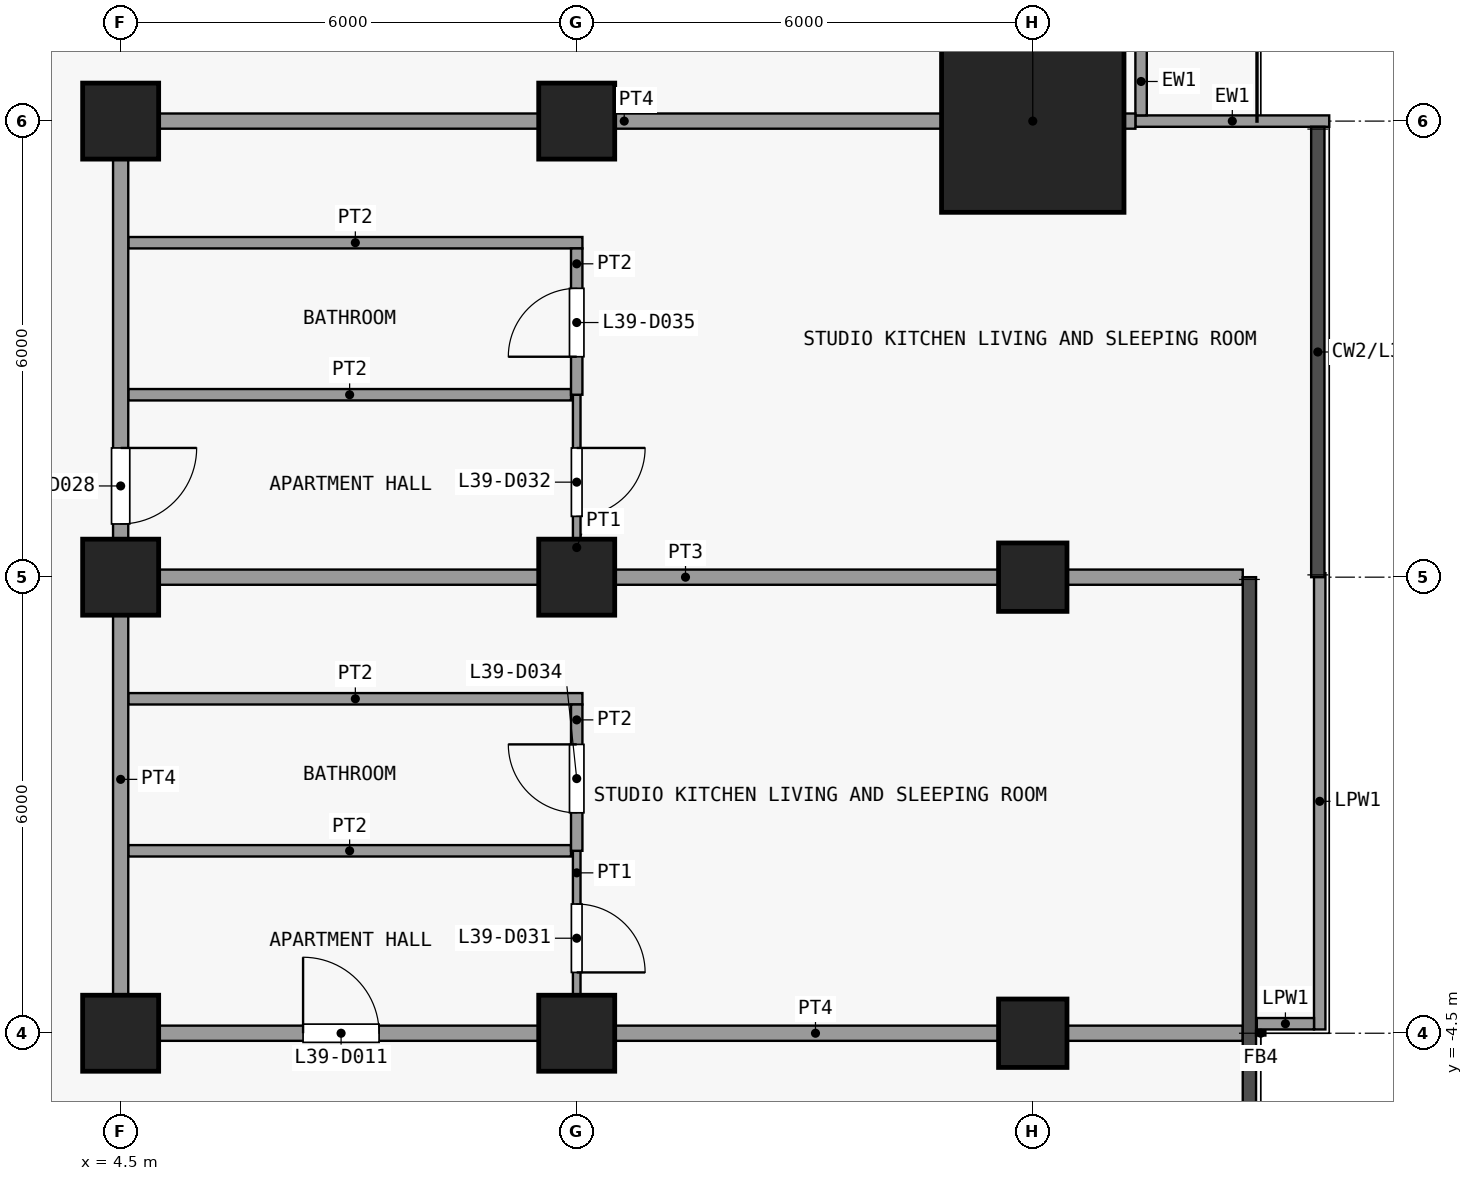
"""IFC4 building model, lengths in metres.
Left out: names, types, materials, properties, quantities, classifications, styles, units other than length and angle.
Written with IfcOpenShell. Run it as: python <this file> out.ifc"""

import sys

from ifc_helpers import new_model, si_unit, direction, frame, frame_2d, origin, origin_2d, place, context, subcontext, project, spatial, rectangle, extrude, element, fill, save


model = new_model("IFC4")
c1 = context("Model", 3, precision=1e-05, world=origin(), true_north=direction((0.0, 1.0)))
c2 = subcontext(c1, "Body", "Model", "MODEL_VIEW")
j1 = project(units=[si_unit("LENGTHUNIT", "METRE"), si_unit("PLANEANGLEUNIT", "RADIAN")], contexts=[c1])
p1 = place(None, origin())
s1 = spatial("IfcSite", under=j1, at=p1, CompositionType="ELEMENT")
p2 = place(p1, origin())
s2 = spatial("IfcBuilding", under=s1, at=p2, CompositionType="ELEMENT")
p3 = place(p2, frame((0.0, 0.0, 160.1)))
s3 = spatial("IfcBuildingStorey", under=s2, at=p3, CompositionType="ELEMENT", Elevation=160.1)
for number, where, z_axis, x_axis in (
    (1, (4.5, -4.5, 0.0), (0.0, 0.0, 1.0), (1.0, 0.0, 0.0)),
    (2, (4.5, 1.5, 0.0), (0.0, 0.0, 1.0), (1.0, 0.0, 0.0)),
    (3, (4.5, 7.5, 0.0), (0.0, 0.0, 1.0), (1.0, 0.0, 0.0)),
    (4, (10.5, -4.5, 0.0), (0.0, 0.0, 1.0), (1.0, 0.0, 0.0)),
    (5, (10.5, 1.5, 0.0), (0.0, 0.0, 1.0), (1.0, 0.0, 0.0)),
    (6, (10.5, 7.5, 0.0), (0.0, 0.0, 1.0), (1.0, 0.0, 0.0)),
):
    element("IfcColumn", number, at=place(p3, frame(where, z_axis=z_axis, x_axis=x_axis)), inside=s3, PredefinedType="COLUMN", context=c2, shape_type="SweptSolid", body=[
        extrude(rectangle(XDim=1.0, YDim=1.0, at=origin_2d()), origin(), (0.0, 0.0, 1.0), 3.6),
    ])
for number, where, z_axis, x_axis in (
    (7, (16.5, -4.5, 0.0), (0.0, 0.0, 1.0), (1.0, 0.0, 0.0)),
    (8, (16.5, 1.5, 0.0), (0.0, 0.0, 1.0), (1.0, 0.0, 0.0)),
):
    element("IfcColumn", number, at=place(p3, frame(where, z_axis=z_axis, x_axis=x_axis)), inside=s3, PredefinedType="COLUMN", context=c2, shape_type="SweptSolid", body=[
        extrude(rectangle(XDim=0.9, YDim=0.9, at=origin_2d()), origin(), (0.0, 0.0, 1.0), 3.6),
    ])
p4 = place(p3, frame((16.5, 7.5, 0.0), z_axis=(0.0, 0.0, 1.0), x_axis=(1.0, 0.0, 0.0)))
e9 = element("IfcColumn", 9, at=p4, inside=s3, PredefinedType="COLUMN", context=c2, shape_type="SweptSolid", body=[
    extrude(rectangle(XDim=2.4, YDim=2.4, at=origin_2d()), origin(), (0.0, 0.0, 1.0), 3.6),
])
p5 = place(p3, frame((17.85, 7.5, 0.0), z_axis=(0.0, 0.0, 1.0), x_axis=(1.0, 0.0, 0.0)))
e10 = element("IfcWall", 10, at=p5, inside=s3, PredefinedType="SOLIDWALL", context=c2, shape_type="SweptSolid", body=[
    extrude(rectangle(XDim=2.55, YDim=0.15, at=frame_2d((1.275, 0.0))), origin(), (0.0, 0.0, 1.0), 3.3),
])
p6 = place(p3, frame((17.925, 13.425, 0.0), z_axis=(0.0, 0.0, 1.0), x_axis=(0.0, -1.0, 0.0)))
e11 = element("IfcWall", 11, at=p6, inside=s3, PredefinedType="SOLIDWALL", context=c2, shape_type="SweptSolid", body=[
    extrude(rectangle(XDim=5.85, YDim=0.15, at=frame_2d((2.925, 0.0))), origin(), (0.0, 0.0, 1.0), 3.3),
])
p7 = place(p6, frame((0.825, 0.0, 0.0)))
e12 = element("IfcOpeningElement", 12, at=p7, cuts=e11, PredefinedType="OPENING", context=c2, shape_type="SweptSolid", body=[
    extrude(rectangle(XDim=1.2, YDim=2.4, at=frame_2d((0.6, 1.2))), frame((0.0, 0.085, 0.0), z_axis=(0.0, -1.0, 0.0), x_axis=(1.0, 0.0, 0.0)), (0.0, 0.0, 1.0), 0.17),
])
p8 = place(p6, frame((3.038, 0.0, 0.9)))
e13 = element("IfcOpeningElement", 13, at=p8, cuts=e11, PredefinedType="OPENING", context=c2, shape_type="SweptSolid", body=[
    extrude(rectangle(XDim=1.8, YDim=2.1, at=frame_2d((0.9, 1.05))), frame((0.0, 0.085, 0.0), z_axis=(0.0, -1.0, 0.0), x_axis=(1.0, 0.0, 0.0)), (0.0, 0.0, 1.0), 0.17),
])
p9 = place(p3, frame((20.275, 1.552, 0.0), z_axis=(0.0, 0.0, 1.0), x_axis=(0.0, -1.0, 0.0)))
e14 = element("IfcWall", 14, at=p9, inside=s3, PredefinedType="PARAPET", context=c2, shape_type="SweptSolid", body=[
    extrude(rectangle(XDim=6.002, YDim=0.15, at=frame_2d((3.001, 0.0))), origin(), (0.0, 0.0, 1.0), 1.15),
])
p10 = place(p3, frame((20.2, -4.375, 0.0), z_axis=(0.0, 0.0, 1.0), x_axis=(-1.0, 0.0, 0.0)))
e15 = element("IfcWall", 15, at=p10, inside=s3, PredefinedType="PARAPET", context=c2, shape_type="SweptSolid", body=[
    extrude(rectangle(XDim=0.752, YDim=0.15, at=frame_2d((0.376, 0.0))), origin(), (0.0, 0.0, 1.0), 1.15),
])
p11 = place(p3, frame((4.4, -4.5, 0.0), z_axis=(0.0, 0.0, 1.0), x_axis=(1.0, 0.0, 0.0)))
e16 = element("IfcWall", 16, at=p11, inside=s3, PredefinedType="PARTITIONING", context=c2, shape_type="SweptSolid", body=[
    extrude(rectangle(XDim=14.863, YDim=0.2, at=frame_2d((7.431, 0.0))), origin(), (0.0, 0.0, 1.0), 3.3),
])
p12 = place(p11, frame((2.5, 0.0, 0.0)))
e17 = element("IfcOpeningElement", 17, at=p12, cuts=e16, PredefinedType="OPENING", context=c2, shape_type="SweptSolid", body=[
    extrude(rectangle(XDim=1.0, YDim=2.1, at=frame_2d((0.5, 1.05))), frame((0.0, 0.11, 0.0), z_axis=(0.0, -1.0, 0.0), x_axis=(1.0, 0.0, 0.0)), (0.0, 0.0, 1.0), 0.22),
])
p13 = place(p3, frame((4.6, -2.1, 0.0), z_axis=(0.0, 0.0, 1.0), x_axis=(1.0, 0.0, 0.0)))
e18 = element("IfcWall", 18, at=p13, inside=s3, PredefinedType="PARTITIONING", context=c2, shape_type="SweptSolid", body=[
    extrude(rectangle(XDim=5.825, YDim=0.15, at=frame_2d((2.913, 0.0))), origin(), (0.0, 0.0, 1.0), 3.3),
])
p14 = place(p3, frame((4.6, -0.1, 0.0), z_axis=(0.0, 0.0, 1.0), x_axis=(1.0, 0.0, 0.0)))
e19 = element("IfcWall", 19, at=p14, inside=s3, PredefinedType="PARTITIONING", context=c2, shape_type="SweptSolid", body=[
    extrude(rectangle(XDim=5.975, YDim=0.15, at=frame_2d((2.987, 0.0))), origin(), (0.0, 0.0, 1.0), 3.3),
])
p15 = place(p3, frame((4.6, 1.5, 0.0), z_axis=(0.0, 0.0, 1.0), x_axis=(1.0, 0.0, 0.0)))
e20 = element("IfcWall", 20, at=p15, inside=s3, PredefinedType="PARTITIONING", context=c2, shape_type="SweptSolid", body=[
    extrude(rectangle(XDim=14.662, YDim=0.2, at=frame_2d((7.331, 0.0))), origin(), (0.0, 0.0, 1.0), 3.3),
])
p16 = place(p3, frame((4.6, 3.9, 0.0), z_axis=(0.0, 0.0, 1.0), x_axis=(1.0, 0.0, 0.0)))
e21 = element("IfcWall", 21, at=p16, inside=s3, PredefinedType="PARTITIONING", context=c2, shape_type="SweptSolid", body=[
    extrude(rectangle(XDim=5.825, YDim=0.15, at=frame_2d((2.913, 0.0))), origin(), (0.0, 0.0, 1.0), 3.3),
])
p17 = place(p3, frame((4.6, 5.9, 0.0), z_axis=(0.0, 0.0, 1.0), x_axis=(1.0, 0.0, 0.0)))
e22 = element("IfcWall", 22, at=p17, inside=s3, PredefinedType="PARTITIONING", context=c2, shape_type="SweptSolid", body=[
    extrude(rectangle(XDim=5.975, YDim=0.15, at=frame_2d((2.987, 0.0))), origin(), (0.0, 0.0, 1.0), 3.3),
])
p18 = place(p3, frame((4.4, 7.5, 0.0), z_axis=(0.0, 0.0, 1.0), x_axis=(1.0, 0.0, 0.0)))
e23 = element("IfcWall", 23, at=p18, inside=s3, PredefinedType="PARTITIONING", context=c2, shape_type="SweptSolid", body=[
    extrude(rectangle(XDim=13.45, YDim=0.2, at=frame_2d((6.725, 0.0))), origin(), (0.0, 0.0, 1.0), 3.3),
])
p19 = place(p3, frame((4.5, -4.4, 0.0), z_axis=(0.0, 0.0, 1.0), x_axis=(0.0, 1.0, 0.0)))
e24 = element("IfcWall", 24, at=p19, inside=s3, PredefinedType="PARTITIONING", context=c2, shape_type="SweptSolid", body=[
    extrude(rectangle(XDim=11.8, YDim=0.2, at=frame_2d((5.9, 0.0))), origin(), (0.0, 0.0, 1.0), 3.3),
])
p20 = place(p19, frame((6.6, 0.0, 0.0)))
e25 = element("IfcOpeningElement", 25, at=p20, cuts=e24, PredefinedType="OPENING", context=c2, shape_type="SweptSolid", body=[
    extrude(rectangle(XDim=1.0, YDim=2.1, at=frame_2d((0.5, 1.05))), frame((0.0, 0.11, 0.0), z_axis=(0.0, -1.0, 0.0), x_axis=(1.0, 0.0, 0.0)), (0.0, 0.0, 1.0), 0.22),
])
p21 = place(p3, frame((10.5, -4.4, 0.0), z_axis=(0.0, 0.0, 1.0), x_axis=(0.0, 1.0, 0.0)))
e26 = element("IfcWall", 26, at=p21, inside=s3, PredefinedType="PARTITIONING", context=c2, shape_type="SweptSolid", body=[
    extrude(rectangle(XDim=2.3, YDim=0.1, at=frame_2d((1.15, 0.0))), origin(), (0.0, 0.0, 1.0), 3.3),
])
p22 = place(p21, frame((0.7, 0.0, 0.0)))
e27 = element("IfcOpeningElement", 27, at=p22, cuts=e26, PredefinedType="OPENING", context=c2, shape_type="SweptSolid", body=[
    extrude(rectangle(XDim=0.9, YDim=2.1, at=frame_2d((0.45, 1.05))), frame((0.0, 0.06, 0.0), z_axis=(0.0, -1.0, 0.0), x_axis=(1.0, 0.0, 0.0)), (0.0, 0.0, 1.0), 0.12),
])
p23 = place(p3, frame((10.5, 1.6, 0.0), z_axis=(0.0, 0.0, 1.0), x_axis=(0.0, 1.0, 0.0)))
e28 = element("IfcWall", 28, at=p23, inside=s3, PredefinedType="PARTITIONING", context=c2, shape_type="SweptSolid", body=[
    extrude(rectangle(XDim=2.3, YDim=0.1, at=frame_2d((1.15, 0.0))), origin(), (0.0, 0.0, 1.0), 3.3),
])
p24 = place(p23, frame((0.7, 0.0, 0.0)))
e29 = element("IfcOpeningElement", 29, at=p24, cuts=e28, PredefinedType="OPENING", context=c2, shape_type="SweptSolid", body=[
    extrude(rectangle(XDim=0.9, YDim=2.1, at=frame_2d((0.45, 1.05))), frame((0.0, 0.06, 0.0), z_axis=(0.0, -1.0, 0.0), x_axis=(1.0, 0.0, 0.0)), (0.0, 0.0, 1.0), 0.12),
])
p25 = place(p3, frame((10.5, -2.1, 0.0), z_axis=(0.0, 0.0, 1.0), x_axis=(0.0, 1.0, 0.0)))
e30 = element("IfcWall", 30, at=p25, inside=s3, PredefinedType="PARTITIONING", context=c2, shape_type="SweptSolid", body=[
    extrude(rectangle(XDim=1.925, YDim=0.15, at=frame_2d((0.962, 0.0))), origin(), (0.0, 0.0, 1.0), 3.3),
])
p26 = place(p25, frame((0.5, 0.0, 0.0)))
e31 = element("IfcOpeningElement", 31, at=p26, cuts=e30, PredefinedType="OPENING", context=c2, shape_type="SweptSolid", body=[
    extrude(rectangle(XDim=0.9, YDim=2.1, at=frame_2d((0.45, 1.05))), frame((0.0, 0.085, 0.0), z_axis=(0.0, -1.0, 0.0), x_axis=(1.0, 0.0, 0.0)), (0.0, 0.0, 1.0), 0.17),
])
p27 = place(p3, frame((10.5, 3.9, 0.0), z_axis=(0.0, 0.0, 1.0), x_axis=(0.0, 1.0, 0.0)))
e32 = element("IfcWall", 32, at=p27, inside=s3, PredefinedType="PARTITIONING", context=c2, shape_type="SweptSolid", body=[
    extrude(rectangle(XDim=1.925, YDim=0.15, at=frame_2d((0.962, 0.0))), origin(), (0.0, 0.0, 1.0), 3.3),
])
p28 = place(p27, frame((0.5, 0.0, 0.0)))
e33 = element("IfcOpeningElement", 33, at=p28, cuts=e32, PredefinedType="OPENING", context=c2, shape_type="SweptSolid", body=[
    extrude(rectangle(XDim=0.9, YDim=2.1, at=frame_2d((0.45, 1.05))), frame((0.0, 0.085, 0.0), z_axis=(0.0, -1.0, 0.0), x_axis=(1.0, 0.0, 0.0)), (0.0, 0.0, 1.0), 0.17),
])
p29 = place(p12, origin())
e34 = element("IfcDoor", 34, at=p29, inside=s3, OperationType="SINGLE_SWING_RIGHT", PredefinedType="DOOR", context=c2, shape_type="SweptSolid", body=[
    extrude(rectangle(XDim=1.0, YDim=2.1, at=frame_2d((0.5, 1.05))), frame((0.0, 0.025, 0.0), z_axis=(0.0, -1.0, 0.0), x_axis=(1.0, 0.0, 0.0)), (0.0, 0.0, 1.0), 0.05),
])
fill(e17, e34)
p30 = place(p20, origin())
e35 = element("IfcDoor", 35, at=p30, inside=s3, OperationType="SINGLE_SWING_RIGHT", PredefinedType="DOOR", context=c2, shape_type="SweptSolid", body=[
    extrude(rectangle(XDim=1.0, YDim=2.1, at=frame_2d((0.5, 1.05))), frame((0.0, 0.025, 0.0), z_axis=(0.0, -1.0, 0.0), x_axis=(1.0, 0.0, 0.0)), (0.0, 0.0, 1.0), 0.05),
])
fill(e25, e35)
p31 = place(p22, origin())
e36 = element("IfcDoor", 36, at=p31, inside=s3, OperationType="SINGLE_SWING_LEFT", PredefinedType="DOOR", context=c2, shape_type="SweptSolid", body=[
    extrude(rectangle(XDim=0.9, YDim=2.1, at=frame_2d((0.45, 1.05))), frame((0.0, 0.025, 0.0), z_axis=(0.0, -1.0, 0.0), x_axis=(1.0, 0.0, 0.0)), (0.0, 0.0, 1.0), 0.05),
])
fill(e27, e36)
p32 = place(p24, origin())
e37 = element("IfcDoor", 37, at=p32, inside=s3, OperationType="SINGLE_SWING_RIGHT", PredefinedType="DOOR", context=c2, shape_type="SweptSolid", body=[
    extrude(rectangle(XDim=0.9, YDim=2.1, at=frame_2d((0.45, 1.05))), frame((0.0, 0.025, 0.0), z_axis=(0.0, -1.0, 0.0), x_axis=(1.0, 0.0, 0.0)), (0.0, 0.0, 1.0), 0.05),
])
fill(e29, e37)
p33 = place(p26, origin())
e38 = element("IfcDoor", 38, at=p33, inside=s3, OperationType="SINGLE_SWING_LEFT", PredefinedType="DOOR", context=c2, shape_type="SweptSolid", body=[
    extrude(rectangle(XDim=0.9, YDim=2.1, at=frame_2d((0.45, 1.05))), frame((0.0, 0.025, 0.0), z_axis=(0.0, -1.0, 0.0), x_axis=(1.0, 0.0, 0.0)), (0.0, 0.0, 1.0), 0.05),
])
fill(e31, e38)
p34 = place(p28, origin())
e39 = element("IfcDoor", 39, at=p34, inside=s3, OperationType="SINGLE_SWING_RIGHT", PredefinedType="DOOR", context=c2, shape_type="SweptSolid", body=[
    extrude(rectangle(XDim=0.9, YDim=2.1, at=frame_2d((0.45, 1.05))), frame((0.0, 0.025, 0.0), z_axis=(0.0, -1.0, 0.0), x_axis=(1.0, 0.0, 0.0)), (0.0, 0.0, 1.0), 0.05),
])
fill(e33, e39)
save(model, sys.argv[1])
